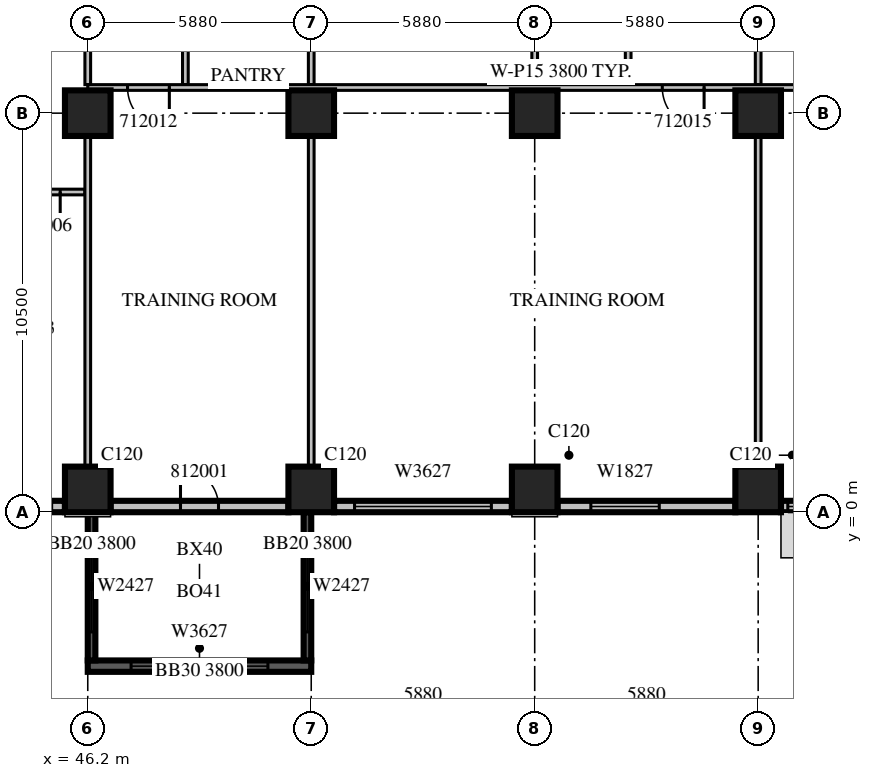
"""IFC4 building model, lengths in metres.
Left out: names, types, materials, properties, quantities, classifications, styles, units other than length and angle.
Written with IfcOpenShell. Run it as: python <this file> out.ifc"""

import sys

from ifc_helpers import new_model, si_unit, direction, frame, frame_2d, origin, origin_2d, place, context, subcontext, project, spatial, rectangle, extrude, source, transform, mapped, element, fill, save


model = new_model("IFC4")
c1 = context("Model", 3, precision=1e-05, world=origin(), true_north=direction((0.0, 1.0)))
c2 = subcontext(c1, "Body", "Model", "MODEL_VIEW")
j1 = project(units=[si_unit("LENGTHUNIT", "METRE"), si_unit("PLANEANGLEUNIT", "RADIAN")], contexts=[c1])
p1 = place(None, origin())
s1 = spatial("IfcSite", under=j1, at=p1, CompositionType="ELEMENT")
p2 = place(p1, origin())
s2 = spatial("IfcBuilding", under=s1, at=p2, CompositionType="ELEMENT")
p3 = place(p2, frame((0.0, 0.0, 61.5)))
s3 = spatial("IfcBuildingStorey", under=s2, at=p3, CompositionType="ELEMENT", Elevation=61.5)
m1 = source(origin(), c2, "Body", "SweptSolid", [
    extrude(rectangle(XDim=1.2, YDim=1.2, at=origin_2d()), origin(), (0.0, 0.0, 1.0), 4.2),
])
for number, where, z_axis, x_axis in (
    (1, (46.2, 0.6, 0.0), (0.0, 0.0, 1.0), (1.0, 0.0, 0.0)),
    (2, (52.08, 0.6, 0.0), (0.0, 0.0, 1.0), (1.0, 0.0, 0.0)),
    (3, (57.96, 0.6, 0.0), (0.0, 0.0, 1.0), (1.0, 0.0, 0.0)),
    (4, (63.84, 0.6, 0.0), (0.0, 0.0, 1.0), (1.0, 0.0, 0.0)),
    (5, (46.2, 10.5, 0.0), (0.0, 0.0, 1.0), (1.0, 0.0, 0.0)),
    (6, (52.08, 10.5, 0.0), (0.0, 0.0, 1.0), (1.0, 0.0, 0.0)),
    (7, (57.96, 10.5, 0.0), (0.0, 0.0, 1.0), (1.0, 0.0, 0.0)),
    (8, (63.84, 10.5, 0.0), (0.0, 0.0, 1.0), (1.0, 0.0, 0.0)),
):
    element("IfcColumn", number, at=place(p3, frame(where, z_axis=z_axis, x_axis=x_axis)), inside=s3, PredefinedType="COLUMN", context=c2, shape_type="MappedRepresentation", body=[
        mapped(m1, transform((0.0, 0.0, 0.0), scale=1.0)),
    ])
m2 = source(origin(), c2, "Body", "SweptSolid", [
    extrude(rectangle(XDim=5.88, YDim=0.3, at=frame_2d((2.94, 0.0))), origin(), (0.0, 0.0, 1.0), 3.8),
])
p4 = place(p3, frame((46.2, -4.05, 0.0), z_axis=(0.0, 0.0, 1.0), x_axis=(1.0, 0.0, 0.0)))
e9 = element("IfcWall", 9, at=p4, inside=s3, PredefinedType="SOLIDWALL", context=c2, shape_type="MappedRepresentation", body=[
    mapped(m2, transform((0.0, 0.0, 0.0), scale=1.0)),
])
m3 = source(origin(), c2, "Body", "SweptSolid", [
    extrude(rectangle(XDim=3.6, YDim=2.7, at=frame_2d((1.8, 1.35))), frame((0.0, 0.16, 0.0), z_axis=(0.0, -1.0, 0.0), x_axis=(1.0, 0.0, 0.0)), (0.0, 0.0, 1.0), 0.32),
])
p5 = place(p4, frame((1.14, 0.0, 0.6)))
e10 = element("IfcOpeningElement", 10, at=p5, cuts=e9, PredefinedType="OPENING", context=c2, shape_type="MappedRepresentation", body=[
    mapped(m3, transform((0.0, 0.0, 0.0), scale=1.0)),
])
m4 = source(origin(), c2, "Body", "SweptSolid", [
    extrude(rectangle(XDim=3.9, YDim=0.2, at=frame_2d((1.95, 0.0))), origin(), (0.0, 0.0, 1.0), 3.8),
])
p6 = place(p3, frame((46.3, 0.0, 0.0), z_axis=(0.0, 0.0, 1.0), x_axis=(0.0, -1.0, 0.0)))
e11 = element("IfcWall", 11, at=p6, inside=s3, PredefinedType="SOLIDWALL", context=c2, shape_type="MappedRepresentation", body=[
    mapped(m4, transform((0.0, 0.0, 0.0), scale=1.0)),
])
m5 = source(origin(), c2, "Body", "SweptSolid", [
    extrude(rectangle(XDim=2.4, YDim=2.7, at=frame_2d((1.2, 1.35))), frame((0.0, 0.11, 0.0), z_axis=(0.0, -1.0, 0.0), x_axis=(1.0, 0.0, 0.0)), (0.0, 0.0, 1.0), 0.22),
])
p7 = place(p6, frame((0.75, 0.0, 0.6)))
e12 = element("IfcOpeningElement", 12, at=p7, cuts=e11, PredefinedType="OPENING", context=c2, shape_type="MappedRepresentation", body=[
    mapped(m5, transform((0.0, 0.0, 0.0), scale=1.0)),
])
p8 = place(p3, frame((51.98, 0.0, 0.0), z_axis=(0.0, 0.0, 1.0), x_axis=(0.0, -1.0, 0.0)))
e13 = element("IfcWall", 13, at=p8, inside=s3, PredefinedType="SOLIDWALL", context=c2, shape_type="MappedRepresentation", body=[
    mapped(m4, transform((0.0, 0.0, 0.0), scale=1.0)),
])
p9 = place(p8, frame((0.75, 0.0, 0.6)))
e14 = element("IfcOpeningElement", 14, at=p9, cuts=e13, PredefinedType="OPENING", context=c2, shape_type="MappedRepresentation", body=[
    mapped(m5, transform((0.0, 0.0, 0.0), scale=1.0)),
])
m6 = source(origin(), c2, "Body", "SweptSolid", [
    extrude(rectangle(XDim=1.6, YDim=0.3, at=frame_2d((0.8, 0.0))), origin(), (0.0, 0.0, 1.0), 3.8),
])
p10 = place(p3, frame((44.0, 0.15, 0.0), z_axis=(0.0, 0.0, 1.0), x_axis=(1.0, 0.0, 0.0)))
e15 = element("IfcWall", 15, at=p10, inside=s3, PredefinedType="STANDARD", context=c2, shape_type="MappedRepresentation", body=[
    mapped(m6, transform((0.0, 0.0, 0.0), scale=1.0)),
])
m7 = source(origin(), c2, "Body", "SweptSolid", [
    extrude(rectangle(XDim=0.9, YDim=2.7, at=frame_2d((0.45, 1.35))), frame((0.0, 0.16, 0.0), z_axis=(0.0, -1.0, 0.0), x_axis=(1.0, 0.0, 0.0)), (0.0, 0.0, 1.0), 0.32),
])
p11 = place(p10, frame((0.35, 0.0, 0.6)))
e16 = element("IfcOpeningElement", 16, at=p11, cuts=e15, PredefinedType="OPENING", context=c2, shape_type="MappedRepresentation", body=[
    mapped(m7, transform((0.0, 0.0, 0.0), scale=1.0)),
])
m8 = source(origin(), c2, "Body", "SweptSolid", [
    extrude(rectangle(XDim=4.68, YDim=0.3, at=frame_2d((2.34, 0.0))), origin(), (0.0, 0.0, 1.0), 3.8),
])
p12 = place(p3, frame((46.8, 0.15, 0.0), z_axis=(0.0, 0.0, 1.0), x_axis=(1.0, 0.0, 0.0)))
e17 = element("IfcWall", 17, at=p12, inside=s3, PredefinedType="STANDARD", context=c2, shape_type="MappedRepresentation", body=[
    mapped(m8, transform((0.0, 0.0, 0.0), scale=1.0)),
])
m9 = source(origin(), c2, "Body", "SweptSolid", [
    extrude(rectangle(XDim=1.0, YDim=2.1, at=frame_2d((0.5, 1.05))), frame((0.0, 0.16, 0.0), z_axis=(0.0, -1.0, 0.0), x_axis=(1.0, 0.0, 0.0)), (0.0, 0.0, 1.0), 0.32),
])
p13 = place(p12, frame((1.84, 0.0, 0.0)))
e18 = element("IfcOpeningElement", 18, at=p13, cuts=e17, PredefinedType="OPENING", context=c2, shape_type="MappedRepresentation", body=[
    mapped(m9, transform((0.0, 0.0, 0.0), scale=1.0)),
])
p14 = place(p3, frame((52.68, 0.15, 0.0), z_axis=(0.0, 0.0, 1.0), x_axis=(1.0, 0.0, 0.0)))
e19 = element("IfcWall", 19, at=p14, inside=s3, PredefinedType="STANDARD", context=c2, shape_type="MappedRepresentation", body=[
    mapped(m8, transform((0.0, 0.0, 0.0), scale=1.0)),
])
p15 = place(p14, frame((0.54, 0.0, 0.6)))
e20 = element("IfcOpeningElement", 20, at=p15, cuts=e19, PredefinedType="OPENING", context=c2, shape_type="MappedRepresentation", body=[
    mapped(m3, transform((0.0, 0.0, 0.0), scale=1.0)),
])
p16 = place(p3, frame((58.56, 0.15, 0.0), z_axis=(0.0, 0.0, 1.0), x_axis=(1.0, 0.0, 0.0)))
e21 = element("IfcWall", 21, at=p16, inside=s3, PredefinedType="STANDARD", context=c2, shape_type="MappedRepresentation", body=[
    mapped(m8, transform((0.0, 0.0, 0.0), scale=1.0)),
])
m10 = source(origin(), c2, "Body", "SweptSolid", [
    extrude(rectangle(XDim=1.8, YDim=2.7, at=frame_2d((0.9, 1.35))), frame((0.0, 0.16, 0.0), z_axis=(0.0, -1.0, 0.0), x_axis=(1.0, 0.0, 0.0)), (0.0, 0.0, 1.0), 0.32),
])
p17 = place(p16, frame((0.877, 0.0, 0.6)))
e22 = element("IfcOpeningElement", 22, at=p17, cuts=e21, PredefinedType="OPENING", context=c2, shape_type="MappedRepresentation", body=[
    mapped(m10, transform((0.0, 0.0, 0.0), scale=1.0)),
])
m11 = source(origin(), c2, "Body", "SweptSolid", [
    extrude(rectangle(XDim=2.76, YDim=0.3, at=frame_2d((1.38, 0.0))), origin(), (0.0, 0.0, 1.0), 3.8),
])
p18 = place(p3, frame((64.44, 0.15, 0.0), z_axis=(0.0, 0.0, 1.0), x_axis=(1.0, 0.0, 0.0)))
e23 = element("IfcWall", 23, at=p18, inside=s3, PredefinedType="STANDARD", context=c2, shape_type="MappedRepresentation", body=[
    mapped(m11, transform((0.0, 0.0, 0.0), scale=1.0)),
])
p19 = place(p18, frame((0.18, 0.0, 0.6)))
e24 = element("IfcOpeningElement", 24, at=p19, cuts=e23, PredefinedType="OPENING", context=c2, shape_type="MappedRepresentation", body=[
    mapped(m10, transform((0.0, 0.0, 0.0), scale=1.0)),
])
m12 = source(origin(), c2, "Body", "SweptSolid", [
    extrude(rectangle(XDim=2.2, YDim=0.15, at=frame_2d((1.1, 0.0))), origin(), (0.0, 0.0, 1.0), 3.8),
])
p20 = place(p3, frame((46.125, 8.425, 0.0), z_axis=(0.0, 0.0, 1.0), x_axis=(-1.0, 0.0, 0.0)))
e25 = element("IfcWall", 25, at=p20, inside=s3, PredefinedType="PARTITIONING", context=c2, shape_type="MappedRepresentation", body=[
    mapped(m12, transform((0.0, 0.0, 0.0), scale=1.0)),
])
m13 = source(origin(), c2, "Body", "SweptSolid", [
    extrude(rectangle(XDim=0.9, YDim=2.1, at=frame_2d((0.45, 1.05))), frame((0.0, 0.085, 0.0), z_axis=(0.0, -1.0, 0.0), x_axis=(1.0, 0.0, 0.0)), (0.0, 0.0, 1.0), 0.17),
])
p21 = place(p20, frame((0.65, 0.0, 0.0)))
e26 = element("IfcOpeningElement", 26, at=p21, cuts=e25, PredefinedType="OPENING", context=c2, shape_type="MappedRepresentation", body=[
    mapped(m13, transform((0.0, 0.0, 0.0), scale=1.0)),
])
m14 = source(origin(), c2, "Body", "SweptSolid", [
    extrude(rectangle(XDim=3.45, YDim=0.15, at=frame_2d((1.725, 0.0))), origin(), (0.0, 0.0, 1.0), 3.8),
])
for number, where, z_axis, x_axis in (
    (27, (48.768, 11.25, 0.0), (0.0, 0.0, 1.0), (0.0, 1.0, 0.0)),
    (28, (57.96, 11.25, 0.0), (0.0, 0.0, 1.0), (0.0, 1.0, 0.0)),
    (29, (60.42, 11.25, 0.0), (0.0, 0.0, 1.0), (0.0, 1.0, 0.0)),
):
    element("IfcWall", number, at=place(p3, frame(where, z_axis=z_axis, x_axis=x_axis)), inside=s3, PredefinedType="PARTITIONING", context=c2, shape_type="MappedRepresentation", body=[
        mapped(m14, transform((0.0, 0.0, 0.0), scale=1.0)),
    ])
m15 = source(origin(), c2, "Body", "SweptSolid", [
    extrude(rectangle(XDim=8.702, YDim=0.15, at=frame_2d((4.351, 0.0))), origin(), (0.0, 0.0, 1.0), 3.8),
])
p22 = place(p3, frame((46.2, 1.199, 0.0), z_axis=(0.0, 0.0, 1.0), x_axis=(0.0, 1.0, 0.0)))
e30 = element("IfcWall", 30, at=p22, inside=s3, PredefinedType="PARTITIONING", context=c2, shape_type="MappedRepresentation", body=[
    mapped(m15, transform((0.0, 0.0, 0.0), scale=1.0)),
])
p23 = place(p3, frame((46.2, 11.25, 0.0), z_axis=(0.0, 0.0, 1.0), x_axis=(0.0, 1.0, 0.0)))
e31 = element("IfcWall", 31, at=p23, inside=s3, PredefinedType="PARTITIONING", context=c2, shape_type="MappedRepresentation", body=[
    mapped(m14, transform((0.0, 0.0, 0.0), scale=1.0)),
])
p24 = place(p3, frame((52.08, 1.199, 0.0), z_axis=(0.0, 0.0, 1.0), x_axis=(0.0, 1.0, 0.0)))
e32 = element("IfcWall", 32, at=p24, inside=s3, PredefinedType="PARTITIONING", context=c2, shape_type="MappedRepresentation", body=[
    mapped(m15, transform((0.0, 0.0, 0.0), scale=1.0)),
])
p25 = place(p3, frame((52.08, 11.25, 0.0), z_axis=(0.0, 0.0, 1.0), x_axis=(0.0, 1.0, 0.0)))
e33 = element("IfcWall", 33, at=p25, inside=s3, PredefinedType="PARTITIONING", context=c2, shape_type="MappedRepresentation", body=[
    mapped(m14, transform((0.0, 0.0, 0.0), scale=1.0)),
])
p26 = place(p3, frame((63.84, 1.199, 0.0), z_axis=(0.0, 0.0, 1.0), x_axis=(0.0, 1.0, 0.0)))
e34 = element("IfcWall", 34, at=p26, inside=s3, PredefinedType="PARTITIONING", context=c2, shape_type="MappedRepresentation", body=[
    mapped(m15, transform((0.0, 0.0, 0.0), scale=1.0)),
])
p27 = place(p3, frame((63.84, 11.25, 0.0), z_axis=(0.0, 0.0, 1.0), x_axis=(0.0, 1.0, 0.0)))
e35 = element("IfcWall", 35, at=p27, inside=s3, PredefinedType="PARTITIONING", context=c2, shape_type="MappedRepresentation", body=[
    mapped(m14, transform((0.0, 0.0, 0.0), scale=1.0)),
])
m16 = source(origin(), c2, "Body", "SweptSolid", [
    extrude(rectangle(XDim=24.9, YDim=0.15, at=frame_2d((12.45, 0.0))), origin(), (0.0, 0.0, 1.0), 3.8),
])
p28 = place(p3, frame((71.1, 11.175, 0.0), z_axis=(0.0, 0.0, 1.0), x_axis=(-1.0, 0.0, 0.0)))
e36 = element("IfcWall", 36, at=p28, inside=s3, PredefinedType="PARTITIONING", context=c2, shape_type="MappedRepresentation", body=[
    mapped(m16, transform((0.0, 0.0, 0.0), scale=1.0)),
])
m17 = source(origin(), c2, "Body", "SweptSolid", [
    extrude(rectangle(XDim=1.1, YDim=2.1, at=frame_2d((0.55, 1.05))), frame((0.0, 0.085, 0.0), z_axis=(0.0, -1.0, 0.0), x_axis=(1.0, 0.0, 0.0)), (0.0, 0.0, 1.0), 0.17),
])
p29 = place(p28, frame((22.753, 0.0, 0.0)))
e37 = element("IfcOpeningElement", 37, at=p29, cuts=e36, PredefinedType="OPENING", context=c2, shape_type="MappedRepresentation", body=[
    mapped(m17, transform((0.0, 0.0, 0.0), scale=1.0)),
])
p30 = place(p28, frame((8.683, 0.0, 0.0)))
e38 = element("IfcOpeningElement", 38, at=p30, cuts=e36, PredefinedType="OPENING", context=c2, shape_type="MappedRepresentation", body=[
    mapped(m17, transform((0.0, 0.0, 0.0), scale=1.0)),
])
p31 = place(p28, frame((4.738, 0.0, 0.0)))
e39 = element("IfcOpeningElement", 39, at=p31, cuts=e36, PredefinedType="OPENING", context=c2, shape_type="MappedRepresentation", body=[
    mapped(m17, transform((0.0, 0.0, 0.0), scale=1.0)),
])
m18 = source(origin(), c2, "Body", "SweptSolid", [
    extrude(rectangle(XDim=3.6, YDim=2.7, at=frame_2d((1.8, 1.35))), frame((0.0, 0.03, 0.0), z_axis=(0.0, -1.0, 0.0), x_axis=(1.0, 0.0, 0.0)), (0.0, 0.0, 1.0), 0.06),
])
p32 = place(p5, origin())
e40 = element("IfcWindow", 40, at=p32, inside=s3, PartitioningType="SINGLE_PANEL", PredefinedType="WINDOW", context=c2, shape_type="MappedRepresentation", body=[
    mapped(m18, transform((0.0, 0.0, 0.0), scale=1.0)),
])
fill(e10, e40)
m19 = source(origin(), c2, "Body", "SweptSolid", [
    extrude(rectangle(XDim=2.4, YDim=2.7, at=frame_2d((1.2, 1.35))), frame((0.0, 0.03, 0.0), z_axis=(0.0, -1.0, 0.0), x_axis=(1.0, 0.0, 0.0)), (0.0, 0.0, 1.0), 0.06),
])
p33 = place(p7, origin())
e41 = element("IfcWindow", 41, at=p33, inside=s3, PartitioningType="SINGLE_PANEL", PredefinedType="WINDOW", context=c2, shape_type="MappedRepresentation", body=[
    mapped(m19, transform((0.0, 0.0, 0.0), scale=1.0)),
])
fill(e12, e41)
p34 = place(p9, origin())
e42 = element("IfcWindow", 42, at=p34, inside=s3, PartitioningType="SINGLE_PANEL", PredefinedType="WINDOW", context=c2, shape_type="MappedRepresentation", body=[
    mapped(m19, transform((0.0, 0.0, 0.0), scale=1.0)),
])
fill(e14, e42)
p35 = place(p15, origin())
e43 = element("IfcWindow", 43, at=p35, inside=s3, PartitioningType="SINGLE_PANEL", PredefinedType="WINDOW", context=c2, shape_type="MappedRepresentation", body=[
    mapped(m18, transform((0.0, 0.0, 0.0), scale=1.0)),
])
fill(e20, e43)
m20 = source(origin(), c2, "Body", "SweptSolid", [
    extrude(rectangle(XDim=1.8, YDim=2.7, at=frame_2d((0.9, 1.35))), frame((0.0, 0.03, 0.0), z_axis=(0.0, -1.0, 0.0), x_axis=(1.0, 0.0, 0.0)), (0.0, 0.0, 1.0), 0.06),
])
p36 = place(p17, origin())
e44 = element("IfcWindow", 44, at=p36, inside=s3, PartitioningType="SINGLE_PANEL", PredefinedType="WINDOW", context=c2, shape_type="MappedRepresentation", body=[
    mapped(m20, transform((0.0, 0.0, 0.0), scale=1.0)),
])
fill(e22, e44)
p37 = place(p19, origin())
e45 = element("IfcWindow", 45, at=p37, inside=s3, PartitioningType="SINGLE_PANEL", PredefinedType="WINDOW", context=c2, shape_type="MappedRepresentation", body=[
    mapped(m20, transform((0.0, 0.0, 0.0), scale=1.0)),
])
fill(e24, e45)
m21 = source(origin(), c2, "Body", "SweptSolid", [
    extrude(rectangle(XDim=0.9, YDim=2.1, at=frame_2d((0.45, 1.05))), frame((0.0, 0.025, 0.0), z_axis=(0.0, -1.0, 0.0), x_axis=(1.0, 0.0, 0.0)), (0.0, 0.0, 1.0), 0.05),
])
p38 = place(p21, origin())
e46 = element("IfcDoor", 46, at=p38, inside=s3, OperationType="SINGLE_SWING_LEFT", PredefinedType="DOOR", context=c2, shape_type="MappedRepresentation", body=[
    mapped(m21, transform((0.0, 0.0, 0.0), scale=1.0)),
])
fill(e26, e46)
m22 = source(origin(), c2, "Body", "SweptSolid", [
    extrude(rectangle(XDim=1.1, YDim=2.1, at=frame_2d((0.55, 1.05))), frame((0.0, 0.025, 0.0), z_axis=(0.0, -1.0, 0.0), x_axis=(1.0, 0.0, 0.0)), (0.0, 0.0, 1.0), 0.05),
])
p39 = place(p29, origin())
e47 = element("IfcDoor", 47, at=p39, inside=s3, OperationType="SINGLE_SWING_LEFT", PredefinedType="DOOR", context=c2, shape_type="MappedRepresentation", body=[
    mapped(m22, transform((0.0, 0.0, 0.0), scale=1.0)),
])
fill(e37, e47)
p40 = place(p30, origin())
e48 = element("IfcDoor", 48, at=p40, inside=s3, OperationType="SINGLE_SWING_LEFT", PredefinedType="DOOR", context=c2, shape_type="MappedRepresentation", body=[
    mapped(m22, transform((0.0, 0.0, 0.0), scale=1.0)),
])
fill(e38, e48)
m23 = source(origin(), c2, "Body", "SweptSolid", [
    extrude(rectangle(XDim=1.0, YDim=2.1, at=frame_2d((0.5, 1.05))), frame((0.0, 0.025, 0.0), z_axis=(0.0, -1.0, 0.0), x_axis=(1.0, 0.0, 0.0)), (0.0, 0.0, 1.0), 0.05),
])
p41 = place(p13, origin())
e49 = element("IfcDoor", 49, at=p41, inside=s3, OperationType="SINGLE_SWING_LEFT", PredefinedType="DOOR", context=c2, shape_type="MappedRepresentation", body=[
    mapped(m23, transform((0.0, 0.0, 0.0), scale=1.0)),
])
fill(e18, e49)
save(model, sys.argv[1])
